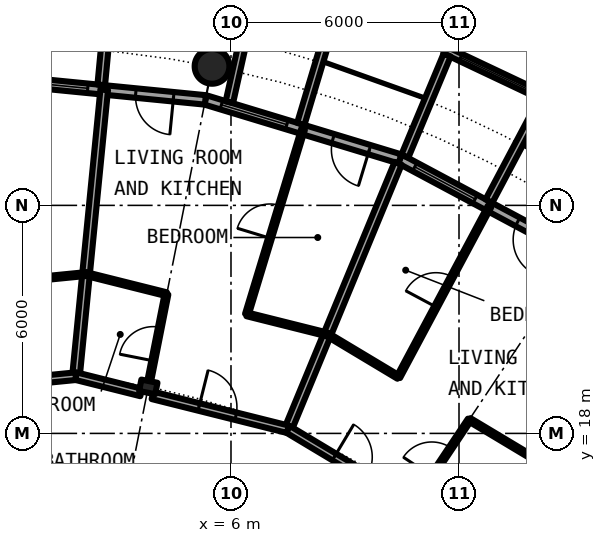
"""IFC4 building model, lengths in metres.
Left out: names, types, materials, properties, quantities, classifications, styles, units other than length and angle.
Written with IfcOpenShell. Run it as: python <this file> out.ifc"""

import sys

from ifc_helpers import new_model, si_unit, direction, frame, frame_2d, origin, origin_2d, place, context, subcontext, project, spatial, rectangle, circle, hollow_circle, i_section, extrude, element, fill, save


model = new_model("IFC4")
c1 = context("Model", 3, precision=1e-05, world=origin(), true_north=direction((0.0, 1.0)))
c2 = subcontext(c1, "Body", "Model", "MODEL_VIEW")
j1 = project(units=[si_unit("LENGTHUNIT", "METRE"), si_unit("PLANEANGLEUNIT", "RADIAN")], contexts=[c1])
p1 = place(None, origin())
s1 = spatial("IfcSite", under=j1, at=p1, CompositionType="ELEMENT")
p2 = place(p1, origin())
s2 = spatial("IfcBuilding", under=s1, at=p2, CompositionType="ELEMENT")
p3 = place(p2, frame((0.0, 0.0, 123.85)))
s3 = spatial("IfcBuildingStorey", under=s2, at=p3, CompositionType="ELEMENT", Elevation=123.85)
p4 = place(p3, frame((5.501, 27.658, 0.0), z_axis=(0.0, 0.0, 1.0), x_axis=(1.0, 0.0, 0.0)))
e1 = element("IfcColumn", 1, at=p4, inside=s3, PredefinedType="COLUMN", context=c2, shape_type="SweptSolid", body=[
    extrude(hollow_circle(Radius=0.457, WallThickness=0.04, at=origin_2d()), origin(), (0.0, 0.0, 1.0), 3.05),
])
p5 = place(p3, frame((3.824, 19.223, 0.0), z_axis=(0.0, 0.0, 1.0), x_axis=(0.195090322016, 0.980785280403, 0.0)))
e2 = element("IfcColumn", 2, at=p5, inside=s3, PredefinedType="COLUMN", context=c2, shape_type="SweptSolid", body=[
    extrude(i_section(OverallWidth=0.307, OverallDepth=0.432, WebThickness=0.021, FlangeThickness=0.04, FilletRadius=0.027, at=origin_2d()), origin(), (0.0, 0.0, 1.0), 3.05),
])
p6 = place(p3, frame((15.167, 22.699, 0.0), z_axis=(0.0, 0.0, 1.0), x_axis=(-0.881915646801, 0.471407246368, 0.0)))
e3 = element("IfcWall", 3, at=p6, inside=s3, PredefinedType="SOLIDWALL", context=c2, shape_type="SweptSolid", body=[
    extrude(rectangle(XDim=5.352, YDim=0.25, at=frame_2d((2.676, 0.0))), origin(), (0.0, 0.0, 1.0), 2.7),
])
p7 = place(p6, frame((0.841, 0.0, 0.0)))
e4 = element("IfcOpeningElement", 4, at=p7, cuts=e3, PredefinedType="OPENING", context=c2, shape_type="SweptSolid", body=[
    extrude(rectangle(XDim=1.0, YDim=2.2, at=frame_2d((0.5, 1.1))), frame((0.0, 0.135, 0.0), z_axis=(0.0, -1.0, 0.0), x_axis=(1.0, 0.0, 0.0)), (0.0, 0.0, 1.0), 0.27),
])
p8 = place(p6, frame((3.111, 0.0, 0.3)))
e5 = element("IfcOpeningElement", 5, at=p8, cuts=e3, PredefinedType="OPENING", context=c2, shape_type="SweptSolid", body=[
    extrude(rectangle(XDim=1.8, YDim=2.1, at=frame_2d((0.9, 1.05))), frame((0.0, 0.135, 0.0), z_axis=(0.0, -1.0, 0.0), x_axis=(1.0, 0.0, 0.0)), (0.0, 0.0, 1.0), 0.27),
])
p9 = place(p3, frame((14.335, 26.808, -0.03), z_axis=(0.0, 0.0, 1.0), x_axis=(-0.904000060331, 0.427532327342, 0.0)))
e6 = element("IfcWall", 6, at=p9, inside=s3, PredefinedType="SOLIDWALL", context=c2, shape_type="SweptSolid", body=[
    extrude(rectangle(XDim=2.993, YDim=0.2, at=frame_2d((1.497, 0.0))), origin(), (0.0, 0.0, 1.0), 2.73),
])
p10 = place(p9, frame((0.457, 0.0, 0.33)))
e7 = element("IfcOpeningElement", 7, at=p10, cuts=e6, PredefinedType="OPENING", context=c2, shape_type="SweptSolid", body=[
    extrude(circle(Radius=1.04, at=frame_2d((1.04, 1.04))), frame((0.0, 0.11, 0.0), z_axis=(0.0, -1.0, 0.0), x_axis=(1.0, 0.0, 0.0)), (0.0, 0.0, 1.0), 0.22),
])
p11 = place(p3, frame((12.787, 24.113, -0.03), z_axis=(0.0, 0.0, 1.0), x_axis=(0.468365282436, 0.883534924159, 0.0)))
e8 = element("IfcWall", 8, at=p11, inside=s3, PredefinedType="SOLIDWALL", context=c2, shape_type="SweptSolid", body=[
    extrude(rectangle(XDim=3.006, YDim=0.2, at=frame_2d((1.503, 0.0))), origin(), (0.0, 0.0, 1.0), 2.73),
])
p12 = place(p3, frame((10.575, 25.295, -0.03), z_axis=(0.0, 0.0, 1.0), x_axis=(0.385697364644, 0.922625353492, 0.0)))
e9 = element("IfcWall", 9, at=p12, inside=s3, PredefinedType="SOLIDWALL", context=c2, shape_type="SweptSolid", body=[
    extrude(rectangle(XDim=2.883, YDim=0.2, at=frame_2d((1.442, 0.0))), origin(), (0.0, 0.0, 1.0), 2.73),
])
p13 = place(p3, frame((10.447, 25.222, 0.0), z_axis=(0.0, 0.0, 1.0), x_axis=(-0.956965678721, 0.290201119486, 0.0)))
e10 = element("IfcWall", 10, at=p13, inside=s3, PredefinedType="SOLIDWALL", context=c2, shape_type="SweptSolid", body=[
    extrude(rectangle(XDim=5.351, YDim=0.25, at=frame_2d((2.676, 0.0))), origin(), (0.0, 0.0, 1.0), 2.7),
])
p14 = place(p13, frame((0.841, 0.0, 0.0)))
e11 = element("IfcOpeningElement", 11, at=p14, cuts=e10, PredefinedType="OPENING", context=c2, shape_type="SweptSolid", body=[
    extrude(rectangle(XDim=1.0, YDim=2.2, at=frame_2d((0.5, 1.1))), frame((0.0, 0.135, 0.0), z_axis=(0.0, -1.0, 0.0), x_axis=(1.0, 0.0, 0.0)), (0.0, 0.0, 1.0), 0.27),
])
p15 = place(p13, frame((3.111, 0.0, 0.3)))
e12 = element("IfcOpeningElement", 12, at=p15, cuts=e10, PredefinedType="OPENING", context=c2, shape_type="SweptSolid", body=[
    extrude(rectangle(XDim=1.8, YDim=2.1, at=frame_2d((0.9, 1.05))), frame((0.0, 0.135, 0.0), z_axis=(0.0, -1.0, 0.0), x_axis=(1.0, 0.0, 0.0)), (0.0, 0.0, 1.0), 0.27),
])
p16 = place(p3, frame((7.837, 26.144, -0.03), z_axis=(0.0, 0.0, 1.0), x_axis=(0.287064767992, 0.957911174889, 0.0)))
e13 = element("IfcWall", 13, at=p16, inside=s3, PredefinedType="SOLIDWALL", context=c2, shape_type="SweptSolid", body=[
    extrude(rectangle(XDim=3.006, YDim=0.2, at=frame_2d((1.503, 0.0))), origin(), (0.0, 0.0, 1.0), 2.73),
])
p17 = place(p3, frame((5.957, 26.715, -0.03), z_axis=(0.0, 0.0, 1.0), x_axis=(0.217857287091, 0.975980636315, 0.0)))
e14 = element("IfcWall", 14, at=p17, inside=s3, PredefinedType="SOLIDWALL", context=c2, shape_type="SweptSolid", body=[
    extrude(rectangle(XDim=2.928, YDim=0.2, at=frame_2d((1.464, 0.0))), origin(), (0.0, 0.0, 1.0), 2.73),
])
p18 = place(p3, frame((5.326, 26.775, 0.0), z_axis=(0.0, 0.0, 1.0), x_axis=(-0.995173996315, 0.098126026407, 0.0)))
e15 = element("IfcWall", 15, at=p18, inside=s3, PredefinedType="SOLIDWALL", context=c2, shape_type="SweptSolid", body=[
    extrude(rectangle(XDim=5.352, YDim=0.25, at=frame_2d((2.676, 0.0))), origin(), (0.0, 0.0, 1.0), 2.7),
])
p19 = place(p18, frame((0.841, 0.0, 0.0)))
e16 = element("IfcOpeningElement", 16, at=p19, cuts=e15, PredefinedType="OPENING", context=c2, shape_type="SweptSolid", body=[
    extrude(rectangle(XDim=1.0, YDim=2.2, at=frame_2d((0.5, 1.1))), frame((0.0, 0.135, 0.0), z_axis=(0.0, -1.0, 0.0), x_axis=(1.0, 0.0, 0.0)), (0.0, 0.0, 1.0), 0.27),
])
p20 = place(p18, frame((3.111, 0.0, 0.3)))
e17 = element("IfcOpeningElement", 17, at=p20, cuts=e15, PredefinedType="OPENING", context=c2, shape_type="SweptSolid", body=[
    extrude(rectangle(XDim=1.8, YDim=2.1, at=frame_2d((0.9, 1.05))), frame((0.0, 0.135, 0.0), z_axis=(0.0, -1.0, 0.0), x_axis=(1.0, 0.0, 0.0)), (0.0, 0.0, 1.0), 0.27),
])
p21 = place(p3, frame((2.586, 27.171, -0.03), z_axis=(0.0, 0.0, 1.0), x_axis=(0.094548432284, 0.995520262954, 0.0)))
e18 = element("IfcWall", 18, at=p21, inside=s3, PredefinedType="SOLIDWALL", context=c2, shape_type="SweptSolid", body=[
    extrude(rectangle(XDim=3.006, YDim=0.2, at=frame_2d((1.503, 0.0))), origin(), (0.0, 0.0, 1.0), 2.73),
])
p22 = place(p3, frame((1.921, 19.506, 0.0), z_axis=(0.0, 0.0, 1.0), x_axis=(0.098115395479, 0.995175044487, 0.0)))
e19 = element("IfcWall", 19, at=p22, inside=s3, PredefinedType="PARTITIONING", context=c2, shape_type="SweptSolid", body=[
    extrude(rectangle(XDim=7.574, YDim=0.2, at=frame_2d((3.787, 0.0))), origin(), (0.0, 0.0, 1.0), 2.7),
])
p23 = place(p3, frame((3.86, 19.436, 0.0), z_axis=(0.0, 0.0, 1.0), x_axis=(0.194627049372, 0.98087731733, 0.0)))
e20 = element("IfcWall", 20, at=p23, inside=s3, PredefinedType="PARTITIONING", context=c2, shape_type="SweptSolid", body=[
    extrude(rectangle(XDim=2.271, YDim=0.1, at=frame_2d((1.135, 0.0))), origin(), (0.0, 0.0, 1.0), 2.7),
])
p24 = place(p23, frame((0.483, 0.0, 0.0)))
e21 = element("IfcOpeningElement", 21, at=p24, cuts=e20, PredefinedType="OPENING", context=c2, shape_type="SweptSolid", body=[
    extrude(rectangle(XDim=0.9, YDim=2.3, at=frame_2d((0.45, 1.15))), frame((0.0, 0.06, 0.0), z_axis=(0.0, -1.0, 0.0), x_axis=(1.0, 0.0, 0.0)), (0.0, 0.0, 1.0), 0.12),
])
p25 = place(p3, frame((6.418, 21.133, 0.0), z_axis=(0.0, 0.0, 1.0), x_axis=(0.290651827018, 0.956828885147, 0.0)))
e22 = element("IfcWall", 22, at=p25, inside=s3, PredefinedType="PARTITIONING", context=c2, shape_type="SweptSolid", body=[
    extrude(rectangle(XDim=5.089, YDim=0.1, at=frame_2d((2.544, 0.0))), origin(), (0.0, 0.0, 1.0), 2.7),
])
p26 = place(p25, frame((2.094, 0.0, 0.0)))
e23 = element("IfcOpeningElement", 23, at=p26, cuts=e22, PredefinedType="OPENING", context=c2, shape_type="SweptSolid", body=[
    extrude(rectangle(XDim=0.9, YDim=2.3, at=frame_2d((0.45, 1.15))), frame((0.0, 0.06, 0.0), z_axis=(0.0, -1.0, 0.0), x_axis=(1.0, 0.0, 0.0)), (0.0, 0.0, 1.0), 0.12),
])
p27 = place(p3, frame((7.501, 18.108, 0.0), z_axis=(0.0, 0.0, 1.0), x_axis=(0.382490346157, 0.923959487801, 0.0)))
e24 = element("IfcWall", 24, at=p27, inside=s3, PredefinedType="PARTITIONING", context=c2, shape_type="SweptSolid", body=[
    extrude(rectangle(XDim=7.574, YDim=0.2, at=frame_2d((3.787, 0.0))), origin(), (0.0, 0.0, 1.0), 2.7),
])
p28 = place(p3, frame((10.405, 19.481, 0.0), z_axis=(0.0, 0.0, 1.0), x_axis=(0.471170755767, 0.882042016522, 0.0)))
e25 = element("IfcWall", 25, at=p28, inside=s3, PredefinedType="PARTITIONING", context=c2, shape_type="SweptSolid", body=[
    extrude(rectangle(XDim=5.089, YDim=0.1, at=frame_2d((2.545, 0.0))), origin(), (0.0, 0.0, 1.0), 2.7),
])
p29 = place(p28, frame((2.095, 0.0, 0.0)))
e26 = element("IfcOpeningElement", 26, at=p29, cuts=e25, PredefinedType="OPENING", context=c2, shape_type="SweptSolid", body=[
    extrude(rectangle(XDim=0.9, YDim=2.3, at=frame_2d((0.45, 1.15))), frame((0.0, 0.06, 0.0), z_axis=(0.0, -1.0, 0.0), x_axis=(1.0, 0.0, 0.0)), (0.0, 0.0, 1.0), 0.12),
])
p30 = place(p3, frame((11.015, 16.473, 0.0), z_axis=(0.0, 0.0, 1.0), x_axis=(0.555568680968, 0.831470649348, 0.0)))
e27 = element("IfcWall", 27, at=p30, inside=s3, PredefinedType="PARTITIONING", context=c2, shape_type="SweptSolid", body=[
    extrude(rectangle(XDim=2.27, YDim=0.1, at=frame_2d((1.135, 0.0))), origin(), (0.0, 0.0, 1.0), 2.7),
])
p31 = place(p30, frame((0.483, 0.0, 0.0)))
e28 = element("IfcOpeningElement", 28, at=p31, cuts=e27, PredefinedType="OPENING", context=c2, shape_type="SweptSolid", body=[
    extrude(rectangle(XDim=0.9, YDim=2.3, at=frame_2d((0.45, 1.15))), frame((0.0, 0.06, 0.0), z_axis=(0.0, -1.0, 0.0), x_axis=(1.0, 0.0, 0.0)), (0.0, 0.0, 1.0), 0.12),
])
p32 = place(p3, frame((12.434, 15.151, 0.0), z_axis=(0.0, 0.0, 1.0), x_axis=(0.634381303318, 0.773020285633, 0.0)))
e29 = element("IfcWall", 29, at=p32, inside=s3, PredefinedType="PARTITIONING", context=c2, shape_type="SweptSolid", body=[
    extrude(rectangle(XDim=7.576, YDim=0.2, at=frame_2d((3.788, 0.0))), origin(), (0.0, 0.0, 1.0), 2.7),
])
p33 = place(p3, frame((-5.696, 18.753, 0.0), z_axis=(0.0, 0.0, 1.0), x_axis=(0.995146797279, 0.098401483048, 0.0)))
e30 = element("IfcWall", 30, at=p33, inside=s3, PredefinedType="PARTITIONING", context=c2, shape_type="SweptSolid", body=[
    extrude(rectangle(XDim=7.654, YDim=0.2, at=frame_2d((3.827, 0.0))), origin(), (0.0, 0.0, 1.0), 2.39),
])
p34 = place(p33, frame((2.556, 0.0, 0.0)))
e31 = element("IfcOpeningElement", 31, at=p34, cuts=e30, PredefinedType="OPENING", context=c2, shape_type="SweptSolid", body=[
    extrude(rectangle(XDim=1.0, YDim=2.3, at=frame_2d((0.5, 1.15))), frame((0.0, 0.11, 0.0), z_axis=(0.0, -1.0, 0.0), x_axis=(1.0, 0.0, 0.0)), (0.0, 0.0, 1.0), 0.22),
])
p35 = place(p3, frame((1.921, 19.506, 0.0), z_axis=(0.0, 0.0, 1.0), x_axis=(0.97002068022, -0.243022385689, 0.0)))
e32 = element("IfcWall", 32, at=p35, inside=s3, PredefinedType="PARTITIONING", context=c2, shape_type="SweptSolid", body=[
    extrude(rectangle(XDim=1.77, YDim=0.2, at=frame_2d((0.885, 0.0))), origin(), (0.0, 0.0, 1.0), 2.39),
])
p36 = place(p3, frame((3.936, 19.001, 0.0), z_axis=(0.0, 0.0, 1.0), x_axis=(0.970025155677, -0.243004521262, 0.0)))
e33 = element("IfcWall", 33, at=p36, inside=s3, PredefinedType="PARTITIONING", context=c2, shape_type="SweptSolid", body=[
    extrude(rectangle(XDim=3.675, YDim=0.2, at=frame_2d((1.837, 0.0))), origin(), (0.0, 0.0, 1.0), 2.39),
])
p37 = place(p36, frame((1.258, 0.0, 0.0)))
e34 = element("IfcOpeningElement", 34, at=p37, cuts=e33, PredefinedType="OPENING", context=c2, shape_type="SweptSolid", body=[
    extrude(rectangle(XDim=1.0, YDim=2.3, at=frame_2d((0.5, 1.15))), frame((0.0, 0.11, 0.0), z_axis=(0.0, -1.0, 0.0), x_axis=(1.0, 0.0, 0.0)), (0.0, 0.0, 1.0), 0.22),
])
p38 = place(p3, frame((7.501, 18.108, 0.0), z_axis=(0.0, 0.0, 1.0), x_axis=(0.857774179698, -0.514026708103, 0.0)))
e35 = element("IfcWall", 35, at=p38, inside=s3, PredefinedType="PARTITIONING", context=c2, shape_type="SweptSolid", body=[
    extrude(rectangle(XDim=3.675, YDim=0.2, at=frame_2d((1.837, 0.0))), origin(), (0.0, 0.0, 1.0), 2.39),
])
p39 = place(p38, frame((1.418, 0.0, 0.0)))
e36 = element("IfcOpeningElement", 36, at=p39, cuts=e35, PredefinedType="OPENING", context=c2, shape_type="SweptSolid", body=[
    extrude(rectangle(XDim=1.0, YDim=2.3, at=frame_2d((0.5, 1.15))), frame((0.0, 0.11, 0.0), z_axis=(0.0, -1.0, 0.0), x_axis=(1.0, 0.0, 0.0)), (0.0, 0.0, 1.0), 0.22),
])
p40 = place(p3, frame((0.021, 21.979, 0.0), z_axis=(0.0, 0.0, 1.0), x_axis=(0.995145478845, 0.098414815623, 0.0)))
e37 = element("IfcWall", 37, at=p40, inside=s3, PredefinedType="PARTITIONING", context=c2, shape_type="SweptSolid", body=[
    extrude(rectangle(XDim=2.176, YDim=0.1, at=frame_2d((1.088, 0.0))), origin(), (0.0, 0.0, 1.0), 2.7),
])
for number, where, z_axis, x_axis in (
    (38, (2.186, 22.193, 0.0), (0.0, 0.0, 1.0), (0.97, -0.243, 0.0)),
    (39, (6.418, 21.133, 0.0), (0.0, 0.0, 1.0), (0.97, -0.243, 0.0)),
):
    element("IfcWall", number, at=place(p3, frame(where, z_axis=z_axis, x_axis=x_axis)), inside=s3, PredefinedType="PARTITIONING", context=c2, shape_type="SweptSolid", body=[
        extrude(rectangle(XDim=2.181, YDim=0.1, at=frame_2d((1.091, 0.0))), origin(), (0.0, 0.0, 1.0), 2.7),
    ])
for number, where, z_axis, x_axis in (
    (40, (8.534, 20.603, 0.0), (0.0, 0.0, 1.0), (0.858, -0.514, 0.0)),
    (41, (12.276, 18.359, 0.0), (0.0, 0.0, 1.0), (0.858, -0.514, 0.0)),
):
    element("IfcWall", number, at=place(p3, frame(where, z_axis=z_axis, x_axis=x_axis)), inside=s3, PredefinedType="PARTITIONING", context=c2, shape_type="SweptSolid", body=[
        extrude(rectangle(XDim=2.182, YDim=0.1, at=frame_2d((1.091, 0.0))), origin(), (0.0, 0.0, 1.0), 2.7),
    ])
p41 = place(p7, origin())
e42 = element("IfcDoor", 42, at=p41, inside=s3, OperationType="SINGLE_SWING_LEFT", PredefinedType="DOOR", context=c2, shape_type="SweptSolid", body=[
    extrude(rectangle(XDim=1.0, YDim=2.2, at=frame_2d((0.5, 1.1))), frame((0.0, 0.025, 0.0), z_axis=(0.0, -1.0, 0.0), x_axis=(1.0, 0.0, 0.0)), (0.0, 0.0, 1.0), 0.05),
])
fill(e4, e42)
p42 = place(p8, origin())
e43 = element("IfcWindow", 43, at=p42, inside=s3, PartitioningType="SINGLE_PANEL", PredefinedType="WINDOW", context=c2, shape_type="SweptSolid", body=[
    extrude(rectangle(XDim=1.8, YDim=2.1, at=frame_2d((0.9, 1.05))), frame((0.0, 0.03, 0.0), z_axis=(0.0, -1.0, 0.0), x_axis=(1.0, 0.0, 0.0)), (0.0, 0.0, 1.0), 0.06),
])
fill(e5, e43)
p43 = place(p10, origin())
e44 = element("IfcWindow", 44, at=p43, inside=s3, PartitioningType="SINGLE_PANEL", PredefinedType="WINDOW", context=c2, shape_type="SweptSolid", body=[
    extrude(circle(Radius=1.04, at=frame_2d((1.04, 1.04))), frame((0.0, 0.03, 0.0), z_axis=(0.0, -1.0, 0.0), x_axis=(1.0, 0.0, 0.0)), (0.0, 0.0, 1.0), 0.06),
])
fill(e7, e44)
p44 = place(p14, origin())
e45 = element("IfcDoor", 45, at=p44, inside=s3, OperationType="SINGLE_SWING_LEFT", PredefinedType="DOOR", context=c2, shape_type="SweptSolid", body=[
    extrude(rectangle(XDim=1.0, YDim=2.2, at=frame_2d((0.5, 1.1))), frame((0.0, 0.025, 0.0), z_axis=(0.0, -1.0, 0.0), x_axis=(1.0, 0.0, 0.0)), (0.0, 0.0, 1.0), 0.05),
])
fill(e11, e45)
p45 = place(p15, origin())
e46 = element("IfcWindow", 46, at=p45, inside=s3, PartitioningType="SINGLE_PANEL", PredefinedType="WINDOW", context=c2, shape_type="SweptSolid", body=[
    extrude(rectangle(XDim=1.8, YDim=2.1, at=frame_2d((0.9, 1.05))), frame((0.0, 0.03, 0.0), z_axis=(0.0, -1.0, 0.0), x_axis=(1.0, 0.0, 0.0)), (0.0, 0.0, 1.0), 0.06),
])
fill(e12, e46)
p46 = place(p19, origin())
e47 = element("IfcDoor", 47, at=p46, inside=s3, OperationType="SINGLE_SWING_LEFT", PredefinedType="DOOR", context=c2, shape_type="SweptSolid", body=[
    extrude(rectangle(XDim=1.0, YDim=2.2, at=frame_2d((0.5, 1.1))), frame((0.0, 0.025, 0.0), z_axis=(0.0, -1.0, 0.0), x_axis=(1.0, 0.0, 0.0)), (0.0, 0.0, 1.0), 0.05),
])
fill(e16, e47)
p47 = place(p20, origin())
e48 = element("IfcWindow", 48, at=p47, inside=s3, PartitioningType="SINGLE_PANEL", PredefinedType="WINDOW", context=c2, shape_type="SweptSolid", body=[
    extrude(rectangle(XDim=1.8, YDim=2.1, at=frame_2d((0.9, 1.05))), frame((0.0, 0.03, 0.0), z_axis=(0.0, -1.0, 0.0), x_axis=(1.0, 0.0, 0.0)), (0.0, 0.0, 1.0), 0.06),
])
fill(e17, e48)
p48 = place(p39, origin())
e49 = element("IfcDoor", 49, at=p48, inside=s3, OperationType="SINGLE_SWING_RIGHT", PredefinedType="DOOR", context=c2, shape_type="SweptSolid", body=[
    extrude(rectangle(XDim=1.0, YDim=2.3, at=frame_2d((0.5, 1.15))), frame((0.0, 0.025, 0.0), z_axis=(0.0, -1.0, 0.0), x_axis=(1.0, 0.0, 0.0)), (0.0, 0.0, 1.0), 0.05),
])
fill(e36, e49)
p49 = place(p31, origin())
e50 = element("IfcDoor", 50, at=p49, inside=s3, OperationType="SINGLE_SWING_LEFT", PredefinedType="DOOR", context=c2, shape_type="SweptSolid", body=[
    extrude(rectangle(XDim=0.9, YDim=2.3, at=frame_2d((0.45, 1.15))), frame((0.0, 0.025, 0.0), z_axis=(0.0, -1.0, 0.0), x_axis=(1.0, 0.0, 0.0)), (0.0, 0.0, 1.0), 0.05),
])
fill(e28, e50)
p50 = place(p29, origin())
e51 = element("IfcDoor", 51, at=p50, inside=s3, OperationType="SINGLE_SWING_RIGHT", PredefinedType="DOOR", context=c2, shape_type="SweptSolid", body=[
    extrude(rectangle(XDim=0.9, YDim=2.3, at=frame_2d((0.45, 1.15))), frame((0.0, 0.025, 0.0), z_axis=(0.0, -1.0, 0.0), x_axis=(1.0, 0.0, 0.0)), (0.0, 0.0, 1.0), 0.05),
])
fill(e26, e51)
p51 = place(p37, origin())
e52 = element("IfcDoor", 52, at=p51, inside=s3, OperationType="SINGLE_SWING_LEFT", PredefinedType="DOOR", context=c2, shape_type="SweptSolid", body=[
    extrude(rectangle(XDim=1.0, YDim=2.3, at=frame_2d((0.5, 1.15))), frame((0.0, 0.025, 0.0), z_axis=(0.0, -1.0, 0.0), x_axis=(1.0, 0.0, 0.0)), (0.0, 0.0, 1.0), 0.05),
])
fill(e34, e52)
p52 = place(p24, origin())
e53 = element("IfcDoor", 53, at=p52, inside=s3, OperationType="SINGLE_SWING_LEFT", PredefinedType="DOOR", context=c2, shape_type="SweptSolid", body=[
    extrude(rectangle(XDim=0.9, YDim=2.3, at=frame_2d((0.45, 1.15))), frame((0.0, 0.025, 0.0), z_axis=(0.0, -1.0, 0.0), x_axis=(1.0, 0.0, 0.0)), (0.0, 0.0, 1.0), 0.05),
])
fill(e21, e53)
p53 = place(p26, origin())
e54 = element("IfcDoor", 54, at=p53, inside=s3, OperationType="SINGLE_SWING_LEFT", PredefinedType="DOOR", context=c2, shape_type="SweptSolid", body=[
    extrude(rectangle(XDim=0.9, YDim=2.3, at=frame_2d((0.45, 1.15))), frame((0.0, 0.025, 0.0), z_axis=(0.0, -1.0, 0.0), x_axis=(1.0, 0.0, 0.0)), (0.0, 0.0, 1.0), 0.05),
])
fill(e23, e54)
save(model, sys.argv[1])
